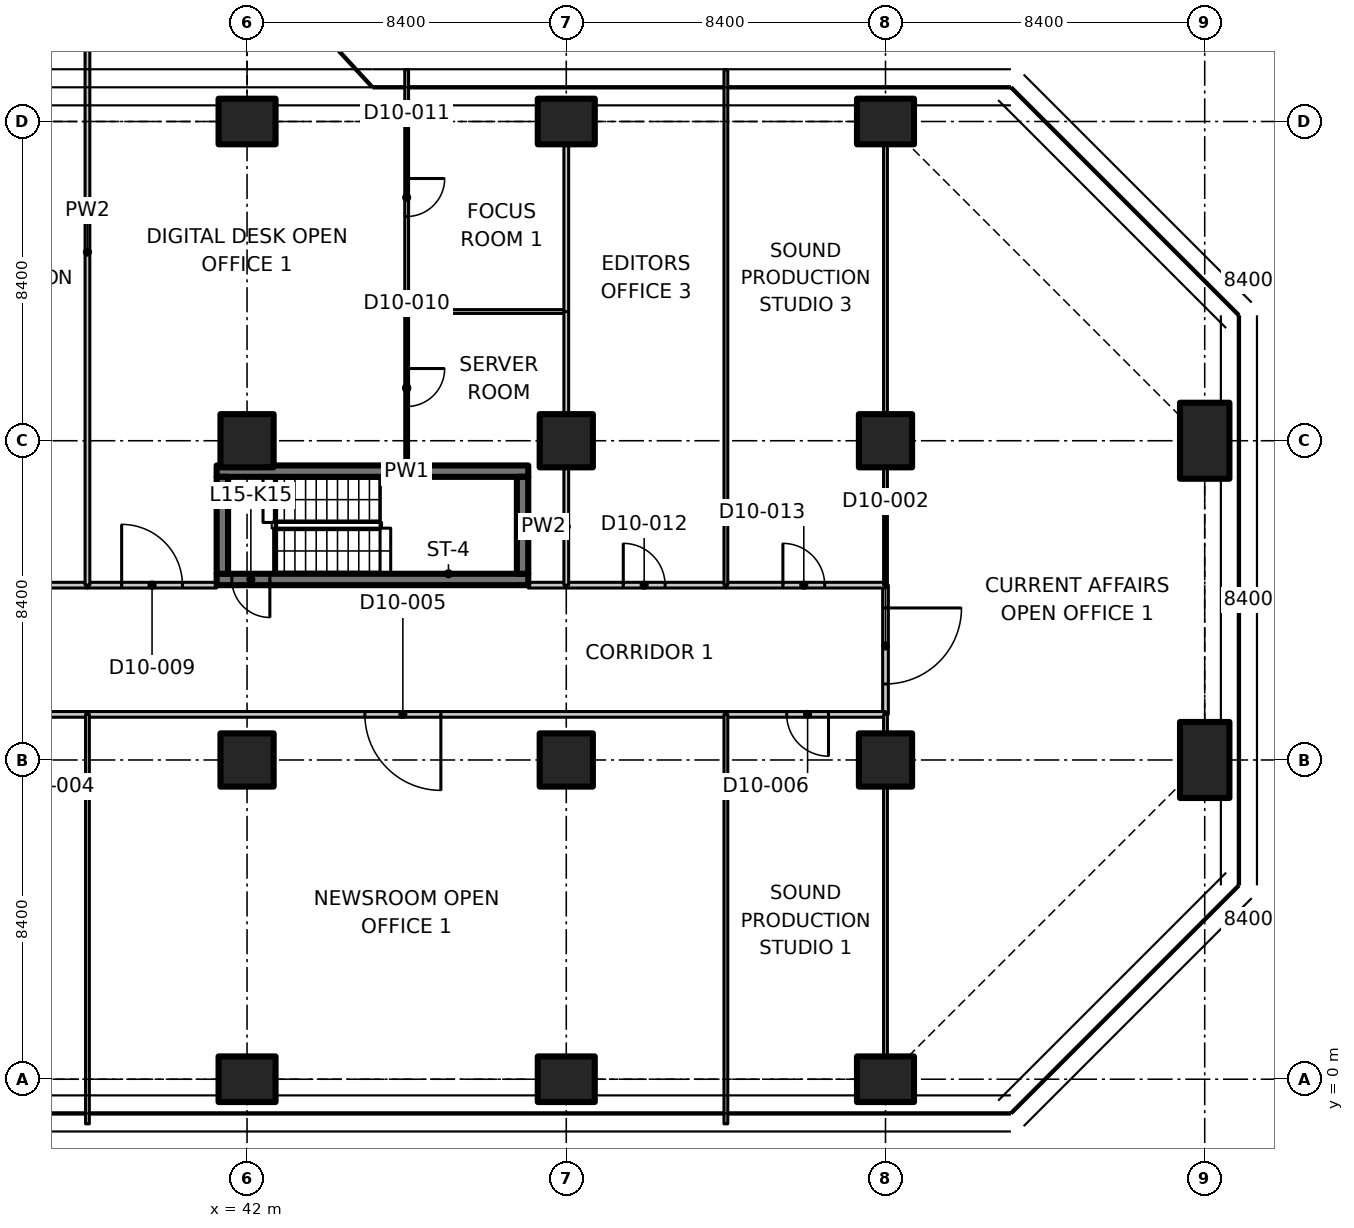
"""IFC4 building model, lengths in metres.
Left out: names, types, materials, properties, quantities, classifications, styles, units other than length and angle.
Written with IfcOpenShell. Run it as: python <this file> out.ifc"""

import sys

from ifc_helpers import new_model, si_unit, direction, frame, frame_2d, origin, origin_2d, place, context, subcontext, project, spatial, polyline, rectangle, outline, extrude, element, fill, save


model = new_model("IFC4")
c1 = context("Model", 3, precision=1e-05, world=origin(), true_north=direction((0.0, 1.0)))
c2 = subcontext(c1, "Body", "Model", "MODEL_VIEW")
j1 = project(units=[si_unit("LENGTHUNIT", "METRE"), si_unit("PLANEANGLEUNIT", "RADIAN")], contexts=[c1])
p1 = place(None, origin())
s1 = spatial("IfcSite", under=j1, at=p1, CompositionType="ELEMENT")
p2 = place(p1, origin())
s2 = spatial("IfcBuilding", under=s1, at=p2, CompositionType="ELEMENT")
p3 = place(p2, frame((0.0, 0.0, 68.9)))
s3 = spatial("IfcBuildingStorey", under=s2, at=p3, CompositionType="ELEMENT", Elevation=68.9)
p4 = place(p3, frame((42.0, 0.0, 0.0), z_axis=(0.0, 0.0, 1.0), x_axis=(0.0, 1.0, 0.0)))
e1 = element("IfcColumn", 1, at=p4, inside=s3, PredefinedType="COLUMN", context=c2, shape_type="SweptSolid", body=[
    extrude(rectangle(XDim=1.2, YDim=1.5, at=origin_2d()), origin(), (0.0, 0.0, 1.0), 3.35),
])
for number, where, z_axis, x_axis in (
    (2, (42.0, 8.4, 0.0), (0.0, 0.0, 1.0), (1.0, 0.0, 0.0)),
    (3, (42.0, 16.8, 0.0), (0.0, 0.0, 1.0), (1.0, 0.0, 0.0)),
):
    element("IfcColumn", number, at=place(p3, frame(where, z_axis=z_axis, x_axis=x_axis)), inside=s3, PredefinedType="COLUMN", context=c2, shape_type="SweptSolid", body=[
        extrude(rectangle(XDim=1.4, YDim=1.4, at=origin_2d()), origin(), (0.0, 0.0, 1.0), 3.35),
    ])
for number, where, z_axis, x_axis in (
    (4, (42.0, 25.2, 0.0), (0.0, 0.0, 1.0), (0.0, 1.0, 0.0)),
    (5, (50.4, 0.0, 0.0), (0.0, 0.0, 1.0), (0.0, 1.0, 0.0)),
):
    element("IfcColumn", number, at=place(p3, frame(where, z_axis=z_axis, x_axis=x_axis)), inside=s3, PredefinedType="COLUMN", context=c2, shape_type="SweptSolid", body=[
        extrude(rectangle(XDim=1.2, YDim=1.5, at=origin_2d()), origin(), (0.0, 0.0, 1.0), 3.35),
    ])
for number, where, z_axis, x_axis in (
    (6, (50.4, 8.4, 0.0), (0.0, 0.0, 1.0), (1.0, 0.0, 0.0)),
    (7, (50.4, 16.8, 0.0), (0.0, 0.0, 1.0), (1.0, 0.0, 0.0)),
):
    element("IfcColumn", number, at=place(p3, frame(where, z_axis=z_axis, x_axis=x_axis)), inside=s3, PredefinedType="COLUMN", context=c2, shape_type="SweptSolid", body=[
        extrude(rectangle(XDim=1.4, YDim=1.4, at=origin_2d()), origin(), (0.0, 0.0, 1.0), 3.35),
    ])
for number, where, z_axis, x_axis in (
    (8, (50.4, 25.2, 0.0), (0.0, 0.0, 1.0), (0.0, 1.0, 0.0)),
    (9, (58.8, 0.0, 0.0), (0.0, 0.0, 1.0), (0.0, 1.0, 0.0)),
):
    element("IfcColumn", number, at=place(p3, frame(where, z_axis=z_axis, x_axis=x_axis)), inside=s3, PredefinedType="COLUMN", context=c2, shape_type="SweptSolid", body=[
        extrude(rectangle(XDim=1.2, YDim=1.5, at=origin_2d()), origin(), (0.0, 0.0, 1.0), 3.35),
    ])
for number, where, z_axis, x_axis in (
    (10, (58.8, 8.4, 0.0), (0.0, 0.0, 1.0), (1.0, 0.0, 0.0)),
    (11, (58.8, 16.8, 0.0), (0.0, 0.0, 1.0), (1.0, 0.0, 0.0)),
):
    element("IfcColumn", number, at=place(p3, frame(where, z_axis=z_axis, x_axis=x_axis)), inside=s3, PredefinedType="COLUMN", context=c2, shape_type="SweptSolid", body=[
        extrude(rectangle(XDim=1.4, YDim=1.4, at=origin_2d()), origin(), (0.0, 0.0, 1.0), 3.35),
    ])
p5 = place(p3, frame((58.8, 25.2, 0.0), z_axis=(0.0, 0.0, 1.0), x_axis=(0.0, 1.0, 0.0)))
e12 = element("IfcColumn", 12, at=p5, inside=s3, PredefinedType="COLUMN", context=c2, shape_type="SweptSolid", body=[
    extrude(rectangle(XDim=1.2, YDim=1.5, at=origin_2d()), origin(), (0.0, 0.0, 1.0), 3.35),
])
for number, where, z_axis, x_axis in (
    (13, (67.2, 8.4, 0.0), (0.0, 0.0, 1.0), (1.0, 0.0, 0.0)),
    (14, (67.2, 16.8, 0.0), (0.0, 0.0, 1.0), (1.0, 0.0, 0.0)),
):
    element("IfcColumn", number, at=place(p3, frame(where, z_axis=z_axis, x_axis=x_axis)), inside=s3, PredefinedType="COLUMN", context=c2, shape_type="SweptSolid", body=[
        extrude(rectangle(XDim=1.3, YDim=2.0, at=origin_2d()), origin(), (0.0, 0.0, 1.0), 3.35),
    ])
p6 = place(p3, frame((49.4, 13.15, 0.0), z_axis=(0.0, 0.0, 1.0), x_axis=(-1.0, 0.0, 0.0)))
e15 = element("IfcWall", 15, at=p6, inside=s3, PredefinedType="SHEAR", context=c2, shape_type="SweptSolid", body=[
    extrude(rectangle(XDim=8.2, YDim=0.3, at=frame_2d((4.1, 0.0))), origin(), (0.0, 0.0, 1.0), 3.35),
])
p7 = place(p6, frame((6.8, 0.0, 0.0)))
e16 = element("IfcOpeningElement", 16, at=p7, cuts=e15, PredefinedType="OPENING", context=c2, shape_type="SweptSolid", body=[
    extrude(rectangle(XDim=1.0, YDim=2.1, at=frame_2d((0.5, 1.05))), frame((0.0, 0.16, 0.0), z_axis=(0.0, -1.0, 0.0), x_axis=(1.0, 0.0, 0.0)), (0.0, 0.0, 1.0), 0.32),
])
p8 = place(p3, frame((41.2, 16.0, 0.0), z_axis=(0.0, 0.0, 1.0), x_axis=(1.0, 0.0, 0.0)))
e17 = element("IfcWall", 17, at=p8, inside=s3, PredefinedType="SHEAR", context=c2, shape_type="SweptSolid", body=[
    extrude(rectangle(XDim=8.2, YDim=0.3, at=frame_2d((4.1, 0.0))), origin(), (0.0, 0.0, 1.0), 3.35),
])
for number, where, z_axis, x_axis in (
    (18, (41.35, 13.3, 0.0), (0.0, 0.0, 1.0), (0.0, 1.0, 0.0)),
    (19, (49.25, 13.3, 0.0), (0.0, 0.0, 1.0), (0.0, 1.0, 0.0)),
):
    element("IfcWall", number, at=place(p3, frame(where, z_axis=z_axis, x_axis=x_axis)), inside=s3, PredefinedType="SHEAR", context=c2, shape_type="SweptSolid", body=[
        extrude(rectangle(XDim=2.55, YDim=0.3, at=frame_2d((1.275, 0.0))), origin(), (0.0, 0.0, 1.0), 3.35),
    ])
p9 = place(p3, frame((58.8, 13.0, 0.0), z_axis=(0.0, 0.0, 1.0), x_axis=(0.0, -1.0, 0.0)))
e20 = element("IfcWall", 20, at=p9, inside=s3, PredefinedType="PARTITIONING", context=c2, shape_type="SweptSolid", body=[
    extrude(rectangle(XDim=3.4, YDim=0.15, at=frame_2d((1.7, 0.0))), origin(), (0.0, 0.0, 1.0), 3.33),
])
p10 = place(p9, frame((0.6, 0.0, 0.0)))
e21 = element("IfcOpeningElement", 21, at=p10, cuts=e20, PredefinedType="OPENING", context=c2, shape_type="SweptSolid", body=[
    extrude(rectangle(XDim=2.0, YDim=2.4, at=frame_2d((1.0, 1.2))), frame((0.0, 0.085, 0.0), z_axis=(0.0, -1.0, 0.0), x_axis=(1.0, 0.0, 0.0)), (0.0, 0.0, 1.0), 0.17),
])
p11 = place(p3, frame((37.8, 9.6, 0.0), z_axis=(0.0, 0.0, 1.0), x_axis=(-1.0, 0.0, 0.0)))
e22 = element("IfcWall", 22, at=p11, inside=s3, PredefinedType="PARTITIONING", context=c2, shape_type="SweptSolid", body=[
    extrude(rectangle(XDim=4.2, YDim=0.15, at=frame_2d((2.1, 0.0))), origin(), (0.0, 0.0, 1.0), 3.33),
])
p12 = place(p11, frame((1.5, 0.0, 0.0)))
e23 = element("IfcOpeningElement", 23, at=p12, cuts=e22, PredefinedType="OPENING", context=c2, shape_type="SweptSolid", body=[
    extrude(rectangle(XDim=1.1, YDim=2.1, at=frame_2d((0.55, 1.05))), frame((0.0, 0.085, 0.0), z_axis=(0.0, -1.0, 0.0), x_axis=(1.0, 0.0, 0.0)), (0.0, 0.0, 1.0), 0.17),
])
p13 = place(p3, frame((54.6, 9.6, 0.0), z_axis=(0.0, 0.0, 1.0), x_axis=(-1.0, 0.0, 0.0)))
e24 = element("IfcWall", 24, at=p13, inside=s3, PredefinedType="PARTITIONING", context=c2, shape_type="SweptSolid", body=[
    extrude(rectangle(XDim=16.8, YDim=0.15, at=frame_2d((8.4, 0.0))), origin(), (0.0, 0.0, 1.0), 3.33),
])
p14 = place(p13, frame((7.5, 0.0, 0.0)))
e25 = element("IfcOpeningElement", 25, at=p14, cuts=e24, PredefinedType="OPENING", context=c2, shape_type="SweptSolid", body=[
    extrude(rectangle(XDim=2.0, YDim=2.4, at=frame_2d((1.0, 1.2))), frame((0.0, 0.085, 0.0), z_axis=(0.0, -1.0, 0.0), x_axis=(1.0, 0.0, 0.0)), (0.0, 0.0, 1.0), 0.17),
])
p15 = place(p3, frame((58.8, 9.6, 0.0), z_axis=(0.0, 0.0, 1.0), x_axis=(-1.0, 0.0, 0.0)))
e26 = element("IfcWall", 26, at=p15, inside=s3, PredefinedType="PARTITIONING", context=c2, shape_type="SweptSolid", body=[
    extrude(rectangle(XDim=4.2, YDim=0.15, at=frame_2d((2.1, 0.0))), origin(), (0.0, 0.0, 1.0), 3.33),
])
p16 = place(p15, frame((1.5, 0.0, 0.0)))
e27 = element("IfcOpeningElement", 27, at=p16, cuts=e26, PredefinedType="OPENING", context=c2, shape_type="SweptSolid", body=[
    extrude(rectangle(XDim=1.1, YDim=2.1, at=frame_2d((0.55, 1.05))), frame((0.0, 0.085, 0.0), z_axis=(0.0, -1.0, 0.0), x_axis=(1.0, 0.0, 0.0)), (0.0, 0.0, 1.0), 0.17),
])
p17 = place(p3, frame((33.6, 13.0, 0.0), z_axis=(0.0, 0.0, 1.0), x_axis=(1.0, 0.0, 0.0)))
e28 = element("IfcWall", 28, at=p17, inside=s3, PredefinedType="PARTITIONING", context=c2, shape_type="SweptSolid", body=[
    extrude(rectangle(XDim=4.2, YDim=0.15, at=frame_2d((2.1, 0.0))), origin(), (0.0, 0.0, 1.0), 3.33),
])
p18 = place(p17, frame((1.2, 0.0, 0.0)))
e29 = element("IfcOpeningElement", 29, at=p18, cuts=e28, PredefinedType="OPENING", context=c2, shape_type="SweptSolid", body=[
    extrude(rectangle(XDim=1.6, YDim=2.1, at=frame_2d((0.8, 1.05))), frame((0.0, 0.085, 0.0), z_axis=(0.0, -1.0, 0.0), x_axis=(1.0, 0.0, 0.0)), (0.0, 0.0, 1.0), 0.17),
])
p19 = place(p3, frame((37.8, 13.0, 0.0), z_axis=(0.0, 0.0, 1.0), x_axis=(1.0, 0.0, 0.0)))
e30 = element("IfcWall", 30, at=p19, inside=s3, PredefinedType="PARTITIONING", context=c2, shape_type="SweptSolid", body=[
    extrude(rectangle(XDim=3.4, YDim=0.15, at=frame_2d((1.7, 0.0))), origin(), (0.0, 0.0, 1.0), 3.33),
])
p20 = place(p19, frame((0.9, 0.0, 0.0)))
e31 = element("IfcOpeningElement", 31, at=p20, cuts=e30, PredefinedType="OPENING", context=c2, shape_type="SweptSolid", body=[
    extrude(rectangle(XDim=1.6, YDim=2.1, at=frame_2d((0.8, 1.05))), frame((0.0, 0.085, 0.0), z_axis=(0.0, -1.0, 0.0), x_axis=(1.0, 0.0, 0.0)), (0.0, 0.0, 1.0), 0.17),
])
p21 = place(p3, frame((49.4, 13.0, 0.0), z_axis=(0.0, 0.0, 1.0), x_axis=(1.0, 0.0, 0.0)))
e32 = element("IfcWall", 32, at=p21, inside=s3, PredefinedType="PARTITIONING", context=c2, shape_type="SweptSolid", body=[
    extrude(rectangle(XDim=1.0, YDim=0.15, at=frame_2d((0.5, 0.0))), origin(), (0.0, 0.0, 1.0), 3.33),
])
p22 = place(p3, frame((50.4, 13.0, 0.0), z_axis=(0.0, 0.0, 1.0), x_axis=(1.0, 0.0, 0.0)))
e33 = element("IfcWall", 33, at=p22, inside=s3, PredefinedType="PARTITIONING", context=c2, shape_type="SweptSolid", body=[
    extrude(rectangle(XDim=4.2, YDim=0.15, at=frame_2d((2.1, 0.0))), origin(), (0.0, 0.0, 1.0), 3.33),
])
p23 = place(p22, frame((1.5, 0.0, 0.0)))
e34 = element("IfcOpeningElement", 34, at=p23, cuts=e33, PredefinedType="OPENING", context=c2, shape_type="SweptSolid", body=[
    extrude(rectangle(XDim=1.1, YDim=2.1, at=frame_2d((0.55, 1.05))), frame((0.0, 0.085, 0.0), z_axis=(0.0, -1.0, 0.0), x_axis=(1.0, 0.0, 0.0)), (0.0, 0.0, 1.0), 0.17),
])
p24 = place(p3, frame((54.6, 13.0, 0.0), z_axis=(0.0, 0.0, 1.0), x_axis=(1.0, 0.0, 0.0)))
e35 = element("IfcWall", 35, at=p24, inside=s3, PredefinedType="PARTITIONING", context=c2, shape_type="SweptSolid", body=[
    extrude(rectangle(XDim=4.2, YDim=0.15, at=frame_2d((2.1, 0.0))), origin(), (0.0, 0.0, 1.0), 3.33),
])
p25 = place(p24, frame((1.5, 0.0, 0.0)))
e36 = element("IfcOpeningElement", 36, at=p25, cuts=e35, PredefinedType="OPENING", context=c2, shape_type="SweptSolid", body=[
    extrude(rectangle(XDim=1.1, YDim=2.1, at=frame_2d((0.55, 1.05))), frame((0.0, 0.085, 0.0), z_axis=(0.0, -1.0, 0.0), x_axis=(1.0, 0.0, 0.0)), (0.0, 0.0, 1.0), 0.17),
])
p26 = place(p3, frame((58.8, 0.62, 0.0), z_axis=(0.0, 0.0, 1.0), x_axis=(0.0, 1.0, 0.0)))
e37 = element("IfcWall", 37, at=p26, inside=s3, PredefinedType="PARTITIONING", context=c2, shape_type="SweptSolid", body=[
    extrude(rectangle(XDim=7.06, YDim=0.1, at=frame_2d((3.53, 0.0))), origin(), (0.0, 0.0, 1.0), 3.33),
])
p27 = place(p3, frame((58.8, 9.12, 0.0), z_axis=(0.0, 0.0, 1.0), x_axis=(0.0, 1.0, 0.0)))
e38 = element("IfcWall", 38, at=p27, inside=s3, PredefinedType="PARTITIONING", context=c2, shape_type="SweptSolid", body=[
    extrude(rectangle(XDim=0.48, YDim=0.1, at=frame_2d((0.24, 0.0))), origin(), (0.0, 0.0, 1.0), 3.33),
])
p28 = place(p3, frame((58.8, 13.0, 0.0), z_axis=(0.0, 0.0, 1.0), x_axis=(0.0, 1.0, 0.0)))
e39 = element("IfcWall", 39, at=p28, inside=s3, PredefinedType="PARTITIONING", context=c2, shape_type="SweptSolid", body=[
    extrude(rectangle(XDim=3.08, YDim=0.1, at=frame_2d((1.54, 0.0))), origin(), (0.0, 0.0, 1.0), 3.33),
])
p29 = place(p3, frame((58.8, 17.52, 0.0), z_axis=(0.0, 0.0, 1.0), x_axis=(0.0, 1.0, 0.0)))
e40 = element("IfcWall", 40, at=p29, inside=s3, PredefinedType="PARTITIONING", context=c2, shape_type="SweptSolid", body=[
    extrude(rectangle(XDim=7.06, YDim=0.1, at=frame_2d((3.53, 0.0))), origin(), (0.0, 0.0, 1.0), 3.33),
])
for number, where, z_axis, x_axis in (
    (41, (37.8, 9.6, 0.0), (0.0, 0.0, 1.0), (0.0, -1.0, 0.0)),
    (42, (54.6, 9.6, 0.0), (0.0, 0.0, 1.0), (0.0, -1.0, 0.0)),
):
    element("IfcWall", number, at=place(p3, frame(where, z_axis=z_axis, x_axis=x_axis)), inside=s3, PredefinedType="PARTITIONING", context=c2, shape_type="SweptSolid", body=[
        extrude(outline(polyline([(0.0, 0.0), (10.774, 0.0), (10.774, 3.33), (10.7, 3.33), (10.05, 3.33), (10.048, 2.98), (9.152, 2.98), (9.15, 3.33), (0.0, 3.33), (0.0, 0.0)])), frame((0.0, 0.05, 0.0), z_axis=(0.0, -1.0, 0.0), x_axis=(1.0, 0.0, 0.0)), (0.0, 0.0, 1.0), 0.1),
    ])
p30 = place(p3, frame((37.8, 30.526, 0.0), z_axis=(0.0, 0.0, 1.0), x_axis=(0.0, -1.0, 0.0)))
e43 = element("IfcWall", 43, at=p30, inside=s3, PredefinedType="PARTITIONING", context=c2, shape_type="SweptSolid", body=[
    extrude(outline(polyline([(0.0, 0.0), (17.526, 0.0), (17.526, 3.33), (5.776, 3.33), (5.774, 2.98), (4.878, 2.98), (4.876, 3.33), (0.283, 3.33), (0.0, 3.33), (0.0, 0.0)])), frame((0.0, 0.062, 0.0), z_axis=(0.0, -1.0, 0.0), x_axis=(1.0, 0.0, 0.0)), (0.0, 0.0, 1.0), 0.125),
])
p31 = place(p3, frame((46.2, 20.2, 0.0), z_axis=(0.0, 0.0, 1.0), x_axis=(0.0, -1.0, 0.0)))
e44 = element("IfcWall", 44, at=p31, inside=s3, PredefinedType="PARTITIONING", context=c2, shape_type="SweptSolid", body=[
    extrude(rectangle(XDim=4.05, YDim=0.1, at=frame_2d((2.025, 0.0))), origin(), (0.0, 0.0, 1.0), 3.33),
])
p32 = place(p31, frame((1.5, 0.0, 0.0)))
e45 = element("IfcOpeningElement", 45, at=p32, cuts=e44, PredefinedType="OPENING", context=c2, shape_type="SweptSolid", body=[
    extrude(rectangle(XDim=1.0, YDim=2.1, at=frame_2d((0.5, 1.05))), frame((0.0, 0.06, 0.0), z_axis=(0.0, -1.0, 0.0), x_axis=(1.0, 0.0, 0.0)), (0.0, 0.0, 1.0), 0.12),
])
p33 = place(p3, frame((46.2, 26.565, 0.0), z_axis=(0.0, 0.0, 1.0), x_axis=(0.0, -1.0, 0.0)))
e46 = element("IfcWall", 46, at=p33, inside=s3, PredefinedType="PARTITIONING", context=c2, shape_type="SweptSolid", body=[
    extrude(outline(polyline([(0.0, 0.0), (6.365, 0.0), (6.365, 3.33), (1.815, 3.33), (1.813, 2.98), (0.917, 2.98), (0.915, 3.33), (0.265, 3.33), (0.0, 3.33), (0.0, 0.0)])), frame((0.0, 0.05, 0.0), z_axis=(0.0, -1.0, 0.0), x_axis=(1.0, 0.0, 0.0)), (0.0, 0.0, 1.0), 0.1),
])
p34 = place(p33, frame((2.865, 0.0, 0.0)))
e47 = element("IfcOpeningElement", 47, at=p34, cuts=e46, PredefinedType="OPENING", context=c2, shape_type="SweptSolid", body=[
    extrude(rectangle(XDim=1.0, YDim=2.1, at=frame_2d((0.5, 1.05))), frame((0.0, 0.06, 0.0), z_axis=(0.0, -1.0, 0.0), x_axis=(1.0, 0.0, 0.0)), (0.0, 0.0, 1.0), 0.12),
])
p35 = place(p3, frame((46.2, 20.2, 0.0), z_axis=(0.0, 0.0, 1.0), x_axis=(1.0, 0.0, 0.0)))
e48 = element("IfcWall", 48, at=p35, inside=s3, PredefinedType="PARTITIONING", context=c2, shape_type="SweptSolid", body=[
    extrude(rectangle(XDim=4.2, YDim=0.1, at=frame_2d((2.1, 0.0))), origin(), (0.0, 0.0, 1.0), 3.33),
])
p36 = place(p3, frame((50.4, 20.2, 0.0), z_axis=(0.0, 0.0, 1.0), x_axis=(0.0, -1.0, 0.0)))
e49 = element("IfcWall", 49, at=p36, inside=s3, PredefinedType="PARTITIONING", context=c2, shape_type="SweptSolid", body=[
    extrude(rectangle(XDim=2.68, YDim=0.125, at=frame_2d((1.34, 0.0))), origin(), (0.0, 0.0, 1.0), 3.33),
])
p37 = place(p3, frame((50.4, 16.08, 0.0), z_axis=(0.0, 0.0, 1.0), x_axis=(0.0, -1.0, 0.0)))
e50 = element("IfcWall", 50, at=p37, inside=s3, PredefinedType="PARTITIONING", context=c2, shape_type="SweptSolid", body=[
    extrude(rectangle(XDim=3.08, YDim=0.125, at=frame_2d((1.54, 0.0))), origin(), (0.0, 0.0, 1.0), 3.33),
])
p38 = place(p3, frame((50.4, 24.58, 0.0), z_axis=(0.0, 0.0, 1.0), x_axis=(0.0, -1.0, 0.0)))
e51 = element("IfcWall", 51, at=p38, inside=s3, PredefinedType="PARTITIONING", context=c2, shape_type="SweptSolid", body=[
    extrude(rectangle(XDim=4.38, YDim=0.125, at=frame_2d((2.19, 0.0))), origin(), (0.0, 0.0, 1.0), 3.33),
])
p39 = place(p3, frame((54.6, 26.565, 0.0), z_axis=(0.0, 0.0, 1.0), x_axis=(0.0, -1.0, 0.0)))
e52 = element("IfcWall", 52, at=p39, inside=s3, PredefinedType="PARTITIONING", context=c2, shape_type="SweptSolid", body=[
    extrude(outline(polyline([(0.0, 0.0), (13.565, 0.0), (13.565, 3.33), (1.815, 3.33), (1.813, 2.98), (0.917, 2.98), (0.915, 3.33), (0.265, 3.33), (0.0, 3.33), (0.0, 0.0)])), frame((0.0, 0.05, 0.0), z_axis=(0.0, -1.0, 0.0), x_axis=(1.0, 0.0, 0.0)), (0.0, 0.0, 1.0), 0.1),
])
p40 = place(p7, origin())
e53 = element("IfcDoor", 53, at=p40, inside=s3, OperationType="SINGLE_SWING_LEFT", PredefinedType="DOOR", context=c2, shape_type="SweptSolid", body=[
    extrude(rectangle(XDim=1.0, YDim=2.1, at=frame_2d((0.5, 1.05))), frame((0.0, 0.025, 0.0), z_axis=(0.0, -1.0, 0.0), x_axis=(1.0, 0.0, 0.0)), (0.0, 0.0, 1.0), 0.05),
])
fill(e16, e53)
p41 = place(p10, origin())
e54 = element("IfcDoor", 54, at=p41, inside=s3, OperationType="DOUBLE_DOOR_SINGLE_SWING", PredefinedType="DOOR", context=c2, shape_type="SweptSolid", body=[
    extrude(rectangle(XDim=2.0, YDim=2.4, at=frame_2d((1.0, 1.2))), frame((0.0, 0.025, 0.0), z_axis=(0.0, -1.0, 0.0), x_axis=(1.0, 0.0, 0.0)), (0.0, 0.0, 1.0), 0.05),
])
fill(e21, e54)
p42 = place(p14, origin())
e55 = element("IfcDoor", 55, at=p42, inside=s3, OperationType="DOUBLE_DOOR_SINGLE_SWING", PredefinedType="DOOR", context=c2, shape_type="SweptSolid", body=[
    extrude(rectangle(XDim=2.0, YDim=2.4, at=frame_2d((1.0, 1.2))), frame((0.0, 0.025, 0.0), z_axis=(0.0, -1.0, 0.0), x_axis=(1.0, 0.0, 0.0)), (0.0, 0.0, 1.0), 0.05),
])
fill(e25, e55)
p43 = place(p16, origin())
e56 = element("IfcDoor", 56, at=p43, inside=s3, OperationType="SINGLE_SWING_LEFT", PredefinedType="DOOR", context=c2, shape_type="SweptSolid", body=[
    extrude(rectangle(XDim=1.1, YDim=2.1, at=frame_2d((0.55, 1.05))), frame((0.0, 0.025, 0.0), z_axis=(0.0, -1.0, 0.0), x_axis=(1.0, 0.0, 0.0)), (0.0, 0.0, 1.0), 0.05),
])
fill(e27, e56)
p44 = place(p20, origin())
e57 = element("IfcDoor", 57, at=p44, inside=s3, OperationType="DOUBLE_DOOR_SINGLE_SWING", PredefinedType="DOOR", context=c2, shape_type="SweptSolid", body=[
    extrude(rectangle(XDim=1.6, YDim=2.1, at=frame_2d((0.8, 1.05))), frame((0.0, 0.025, 0.0), z_axis=(0.0, -1.0, 0.0), x_axis=(1.0, 0.0, 0.0)), (0.0, 0.0, 1.0), 0.05),
])
fill(e31, e57)
p45 = place(p32, origin())
e58 = element("IfcDoor", 58, at=p45, inside=s3, OperationType="SINGLE_SWING_LEFT", PredefinedType="DOOR", context=c2, shape_type="SweptSolid", body=[
    extrude(rectangle(XDim=1.0, YDim=2.1, at=frame_2d((0.5, 1.05))), frame((0.0, 0.025, 0.0), z_axis=(0.0, -1.0, 0.0), x_axis=(1.0, 0.0, 0.0)), (0.0, 0.0, 1.0), 0.05),
])
fill(e45, e58)
p46 = place(p34, origin())
e59 = element("IfcDoor", 59, at=p46, inside=s3, OperationType="SINGLE_SWING_LEFT", PredefinedType="DOOR", context=c2, shape_type="SweptSolid", body=[
    extrude(rectangle(XDim=1.0, YDim=2.1, at=frame_2d((0.5, 1.05))), frame((0.0, 0.025, 0.0), z_axis=(0.0, -1.0, 0.0), x_axis=(1.0, 0.0, 0.0)), (0.0, 0.0, 1.0), 0.05),
])
fill(e47, e59)
p47 = place(p23, origin())
e60 = element("IfcDoor", 60, at=p47, inside=s3, OperationType="SINGLE_SWING_LEFT", PredefinedType="DOOR", context=c2, shape_type="SweptSolid", body=[
    extrude(rectangle(XDim=1.1, YDim=2.1, at=frame_2d((0.55, 1.05))), frame((0.0, 0.025, 0.0), z_axis=(0.0, -1.0, 0.0), x_axis=(1.0, 0.0, 0.0)), (0.0, 0.0, 1.0), 0.05),
])
fill(e34, e60)
p48 = place(p25, origin())
e61 = element("IfcDoor", 61, at=p48, inside=s3, OperationType="SINGLE_SWING_LEFT", PredefinedType="DOOR", context=c2, shape_type="SweptSolid", body=[
    extrude(rectangle(XDim=1.1, YDim=2.1, at=frame_2d((0.55, 1.05))), frame((0.0, 0.025, 0.0), z_axis=(0.0, -1.0, 0.0), x_axis=(1.0, 0.0, 0.0)), (0.0, 0.0, 1.0), 0.05),
])
fill(e36, e61)
save(model, sys.argv[1])
